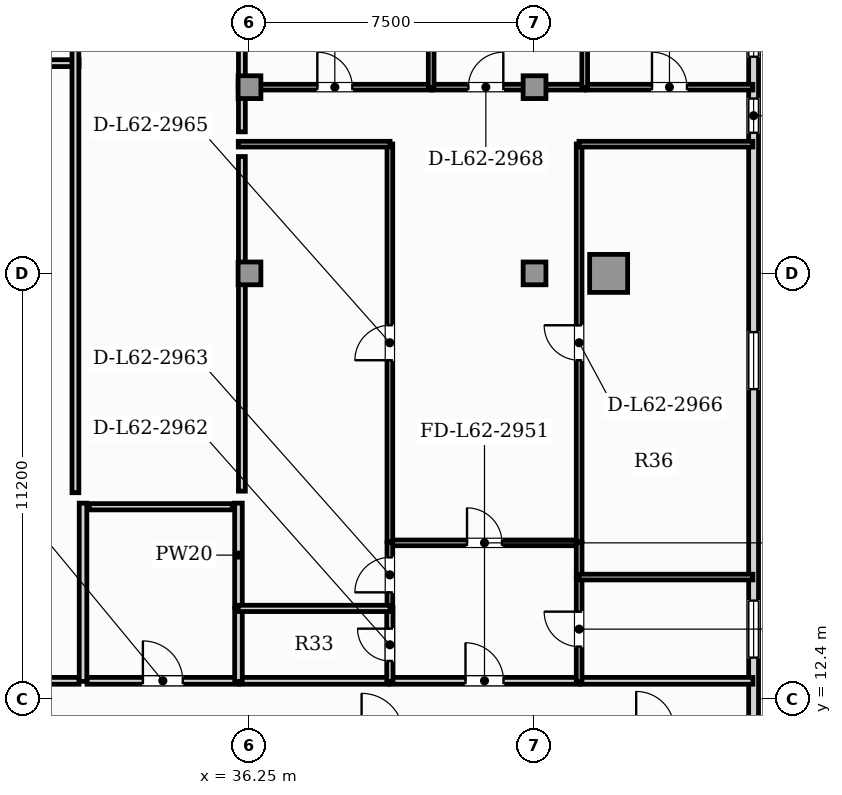
"""IFC4 building model, lengths in metres.
Left out: names, types, materials, properties, quantities, classifications, styles, units other than length and angle.
Written with IfcOpenShell. Run it as: python <this file> out.ifc"""

import sys

from ifc_helpers import new_model, si_unit, direction, frame, frame_2d, origin, origin_2d, place, context, subcontext, project, spatial, rectangle, hollow_rectangle, extrude, element, fill, save


model = new_model("IFC4")
c1 = context("Model", 3, precision=1e-05, world=origin(), true_north=direction((0.0, 1.0)))
c2 = subcontext(c1, "Body", "Model", "MODEL_VIEW")
j1 = project(units=[si_unit("LENGTHUNIT", "METRE"), si_unit("PLANEANGLEUNIT", "RADIAN")], contexts=[c1])
p1 = place(None, origin())
s1 = spatial("IfcSite", under=j1, at=p1, CompositionType="ELEMENT")
p2 = place(p1, origin())
s2 = spatial("IfcBuilding", under=s1, at=p2, CompositionType="ELEMENT")
p3 = place(p2, frame((0.0, 0.0, 251.7)))
s3 = spatial("IfcBuildingStorey", under=s2, at=p3, CompositionType="ELEMENT", Elevation=251.7)
p4 = place(p3, frame((45.7, 23.6, 0.0), z_axis=(0.0, 0.0, 1.0), x_axis=(1.0, 0.0, 0.0)))
e1 = element("IfcColumn", 1, at=p4, inside=s3, PredefinedType="USERDEFINED", context=c2, shape_type="SweptSolid", body=[
    extrude(hollow_rectangle(XDim=1.0, YDim=1.0, WallThickness=0.06, at=origin_2d()), origin(), (0.0, 0.0, 1.0), 5.05),
])
for number, where, z_axis, x_axis in (
    (2, (36.25, 23.6, 0.0), (0.0, 0.0, 1.0), (1.0, 0.0, 0.0)),
    (3, (43.75, 23.6, 0.0), (0.0, 0.0, 1.0), (1.0, 0.0, 0.0)),
    (4, (36.25, 28.5, 0.0), (0.0, 0.0, 1.0), (1.0, 0.0, 0.0)),
    (5, (43.75, 28.5, 0.0), (0.0, 0.0, 1.0), (1.0, 0.0, 0.0)),
):
    element("IfcColumn", number, at=place(p3, frame(where, z_axis=z_axis, x_axis=x_axis)), inside=s3, PredefinedType="COLUMN", context=c2, shape_type="SweptSolid", body=[
        extrude(rectangle(XDim=0.6, YDim=0.6, at=origin_2d()), origin(), (0.0, 0.0, 1.0), 5.05),
    ])
p5 = place(p3, frame((49.514, 3.24, 0.0), z_axis=(0.0, 0.0, 1.0), x_axis=(0.0, 1.0, 0.0)))
e6 = element("IfcWall", 6, at=p5, inside=s3, PredefinedType="SOLIDWALL", context=c2, shape_type="SweptSolid", body=[
    extrude(rectangle(XDim=29.692, YDim=0.26, at=frame_2d((14.846, 0.0))), origin(), (0.0, 0.0, 1.0), 4.85),
])
p6 = place(p5, frame((24.06, 0.0, 0.95)))
e7 = element("IfcOpeningElement", 7, at=p6, cuts=e6, PredefinedType="OPENING", context=c2, shape_type="SweptSolid", body=[
    extrude(rectangle(XDim=0.9, YDim=1.5, at=frame_2d((0.45, 0.75))), frame((0.0, 0.14, 0.0), z_axis=(0.0, -1.0, 0.0), x_axis=(1.0, 0.0, 0.0)), (0.0, 0.0, 1.0), 0.28),
])
p7 = place(p5, frame((10.25, 0.0, 0.9)))
e8 = element("IfcOpeningElement", 8, at=p7, cuts=e6, PredefinedType="OPENING", context=c2, shape_type="SweptSolid", body=[
    extrude(rectangle(XDim=1.5, YDim=1.95, at=frame_2d((0.75, 0.975))), frame((0.0, 0.14, 0.0), z_axis=(0.0, -1.0, 0.0), x_axis=(1.0, 0.0, 0.0)), (0.0, 0.0, 1.0), 0.28),
])
p8 = place(p5, frame((17.315, 0.0, 0.9)))
e9 = element("IfcOpeningElement", 9, at=p8, cuts=e6, PredefinedType="OPENING", context=c2, shape_type="SweptSolid", body=[
    extrude(rectangle(XDim=1.5, YDim=1.95, at=frame_2d((0.75, 0.975))), frame((0.0, 0.14, 0.0), z_axis=(0.0, -1.0, 0.0), x_axis=(1.0, 0.0, 0.0)), (0.0, 0.0, 1.0), 0.28),
])
p9 = place(p5, frame((26.061, 0.0, 0.9)))
e10 = element("IfcOpeningElement", 10, at=p9, cuts=e6, PredefinedType="OPENING", context=c2, shape_type="SweptSolid", body=[
    extrude(rectangle(XDim=1.5, YDim=1.95, at=frame_2d((0.75, 0.975))), frame((0.0, 0.14, 0.0), z_axis=(0.0, -1.0, 0.0), x_axis=(1.0, 0.0, 0.0)), (0.0, 0.0, 1.0), 0.28),
])
p10 = place(p3, frame((21.535, 12.88, 0.0), z_axis=(0.0, 0.0, 1.0), x_axis=(1.0, 0.0, 0.0)))
e11 = element("IfcWall", 11, at=p10, inside=s3, PredefinedType="PARTITIONING", context=c2, shape_type="SweptSolid", body=[
    extrude(rectangle(XDim=10.23, YDim=0.18, at=frame_2d((5.115, 0.0))), origin(), (0.0, 0.0, 1.0), 4.85),
])
p11 = place(p10, frame((3.081, 0.0, 0.0)))
e12 = element("IfcOpeningElement", 12, at=p11, cuts=e11, PredefinedType="OPENING", context=c2, shape_type="SweptSolid", body=[
    extrude(rectangle(XDim=1.0, YDim=2.15, at=frame_2d((0.5, 1.075))), frame((0.0, 0.1, 0.0), z_axis=(0.0, -1.0, 0.0), x_axis=(1.0, 0.0, 0.0)), (0.0, 0.0, 1.0), 0.2),
])
p12 = place(p3, frame((31.975, 12.88, 0.0), z_axis=(0.0, 0.0, 1.0), x_axis=(1.0, 0.0, 0.0)))
e13 = element("IfcWall", 13, at=p12, inside=s3, PredefinedType="PARTITIONING", context=c2, shape_type="SweptSolid", body=[
    extrude(rectangle(XDim=3.99, YDim=0.18, at=frame_2d((1.995, 0.0))), origin(), (0.0, 0.0, 1.0), 4.85),
])
p13 = place(p12, frame((1.47, 0.0, 0.0)))
e14 = element("IfcOpeningElement", 14, at=p13, cuts=e13, PredefinedType="OPENING", context=c2, shape_type="SweptSolid", body=[
    extrude(rectangle(XDim=1.05, YDim=2.15, at=frame_2d((0.525, 1.075))), frame((0.0, 0.1, 0.0), z_axis=(0.0, -1.0, 0.0), x_axis=(1.0, 0.0, 0.0)), (0.0, 0.0, 1.0), 0.2),
])
p14 = place(p3, frame((39.939, 12.88, 0.0), z_axis=(0.0, 0.0, 1.0), x_axis=(1.0, 0.0, 0.0)))
e15 = element("IfcWall", 15, at=p14, inside=s3, PredefinedType="PARTITIONING", context=c2, shape_type="SweptSolid", body=[
    extrude(rectangle(XDim=4.99, YDim=0.18, at=frame_2d((2.495, 0.0))), origin(), (0.0, 0.0, 1.0), 4.85),
])
p15 = place(p14, frame((1.995, 0.0, 0.0)))
e16 = element("IfcOpeningElement", 16, at=p15, cuts=e15, PredefinedType="OPENING", context=c2, shape_type="SweptSolid", body=[
    extrude(rectangle(XDim=1.0, YDim=2.15, at=frame_2d((0.5, 1.075))), frame((0.0, 0.1, 0.0), z_axis=(0.0, -1.0, 0.0), x_axis=(1.0, 0.0, 0.0)), (0.0, 0.0, 1.0), 0.2),
])
p16 = place(p3, frame((35.995, 12.88, 0.0), z_axis=(0.0, 0.0, 1.0), x_axis=(1.0, 0.0, 0.0)))
e17 = element("IfcWall", 17, at=p16, inside=s3, PredefinedType="PARTITIONING", context=c2, shape_type="SweptSolid", body=[
    extrude(rectangle(XDim=3.914, YDim=0.18, at=frame_2d((1.957, 0.0))), origin(), (0.0, 0.0, 1.0), 4.85),
])
p17 = place(p3, frame((44.959, 12.88, 0.0), z_axis=(0.0, 0.0, 1.0), x_axis=(1.0, 0.0, 0.0)))
e18 = element("IfcWall", 18, at=p17, inside=s3, PredefinedType="PARTITIONING", context=c2, shape_type="SweptSolid", body=[
    extrude(rectangle(XDim=4.536, YDim=0.18, at=frame_2d((2.268, 0.0))), origin(), (0.0, 0.0, 1.0), 4.85),
])
p18 = place(p3, frame((31.87, 12.865, 0.0), z_axis=(0.0, 0.0, 1.0), x_axis=(0.0, 1.0, 0.0)))
e19 = element("IfcWall", 19, at=p18, inside=s3, PredefinedType="PARTITIONING", context=c2, shape_type="SweptSolid", body=[
    extrude(rectangle(XDim=4.69, YDim=0.2, at=frame_2d((2.345, 0.0))), origin(), (0.0, 0.0, 1.0), 4.85),
])
p19 = place(p3, frame((35.96, 12.865, 0.0), z_axis=(0.0, 0.0, 1.0), x_axis=(0.0, 1.0, 0.0)))
e20 = element("IfcWall", 20, at=p19, inside=s3, PredefinedType="PARTITIONING", context=c2, shape_type="SweptSolid", body=[
    extrude(rectangle(XDim=1.925, YDim=0.2, at=frame_2d((0.963, 0.0))), origin(), (0.0, 0.0, 1.0), 4.85),
])
p20 = place(p3, frame((35.96, 14.82, 0.0), z_axis=(0.0, 0.0, 1.0), x_axis=(0.0, 1.0, 0.0)))
e21 = element("IfcWall", 21, at=p20, inside=s3, PredefinedType="PARTITIONING", context=c2, shape_type="SweptSolid", body=[
    extrude(rectangle(XDim=2.735, YDim=0.2, at=frame_2d((1.367, 0.0))), origin(), (0.0, 0.0, 1.0), 4.85),
])
p21 = place(p3, frame((39.939, 16.51, 0.0), z_axis=(0.0, 0.0, 1.0), x_axis=(1.0, 0.0, 0.0)))
e22 = element("IfcWall", 22, at=p21, inside=s3, PredefinedType="PARTITIONING", context=c2, shape_type="SweptSolid", body=[
    extrude(rectangle(XDim=4.99, YDim=0.15, at=frame_2d((2.495, 0.0))), origin(), (0.0, 0.0, 1.0), 4.85),
])
p22 = place(p21, frame((2.035, 0.0, 0.0)))
e23 = element("IfcOpeningElement", 23, at=p22, cuts=e22, PredefinedType="OPENING", context=c2, shape_type="SweptSolid", body=[
    extrude(rectangle(XDim=0.92, YDim=2.1, at=frame_2d((0.46, 1.05))), frame((0.0, 0.085, 0.0), z_axis=(0.0, -1.0, 0.0), x_axis=(1.0, 0.0, 0.0)), (0.0, 0.0, 1.0), 0.17),
])
p23 = place(p3, frame((39.944, 12.865, 0.0), z_axis=(0.0, 0.0, 1.0), x_axis=(0.0, 1.0, 0.0)))
e24 = element("IfcWall", 24, at=p23, inside=s3, PredefinedType="PLUMBINGWALL", context=c2, shape_type="SweptSolid", body=[
    extrude(rectangle(XDim=1.925, YDim=0.165, at=frame_2d((0.963, 0.0))), origin(), (0.0, 0.0, 1.0), 4.85),
])
p24 = place(p23, frame((0.538, 0.0, 0.0)))
e25 = element("IfcOpeningElement", 25, at=p24, cuts=e24, PredefinedType="OPENING", context=c2, shape_type="SweptSolid", body=[
    extrude(rectangle(XDim=0.85, YDim=2.1, at=frame_2d((0.425, 1.05))), frame((0.0, 0.093, 0.0), z_axis=(0.0, -1.0, 0.0), x_axis=(1.0, 0.0, 0.0)), (0.0, 0.0, 1.0), 0.185),
])
p25 = place(p3, frame((39.944, 14.82, 0.0), z_axis=(0.0, 0.0, 1.0), x_axis=(0.0, 1.0, 0.0)))
e26 = element("IfcWall", 26, at=p25, inside=s3, PredefinedType="PARTITIONING", context=c2, shape_type="SweptSolid", body=[
    extrude(rectangle(XDim=1.695, YDim=0.15, at=frame_2d((0.847, 0.0))), origin(), (0.0, 0.0, 1.0), 4.85),
])
p26 = place(p25, frame((0.387, 0.0, 0.0)))
e27 = element("IfcOpeningElement", 27, at=p26, cuts=e26, PredefinedType="OPENING", context=c2, shape_type="SweptSolid", body=[
    extrude(rectangle(XDim=0.92, YDim=2.1, at=frame_2d((0.46, 1.05))), frame((0.0, 0.085, 0.0), z_axis=(0.0, -1.0, 0.0), x_axis=(1.0, 0.0, 0.0)), (0.0, 0.0, 1.0), 0.17),
])
p27 = place(p3, frame((44.924, 12.865, 0.0), z_axis=(0.0, 0.0, 1.0), x_axis=(0.0, 1.0, 0.0)))
e28 = element("IfcWall", 28, at=p27, inside=s3, PredefinedType="PARTITIONING", context=c2, shape_type="SweptSolid", body=[
    extrude(rectangle(XDim=2.75, YDim=0.15, at=frame_2d((1.375, 0.0))), origin(), (0.0, 0.0, 1.0), 4.85),
])
p28 = place(p27, frame((0.915, 0.0, 0.0)))
e29 = element("IfcOpeningElement", 29, at=p28, cuts=e28, PredefinedType="OPENING", context=c2, shape_type="SweptSolid", body=[
    extrude(rectangle(XDim=0.92, YDim=2.1, at=frame_2d((0.46, 1.05))), frame((0.0, 0.085, 0.0), z_axis=(0.0, -1.0, 0.0), x_axis=(1.0, 0.0, 0.0)), (0.0, 0.0, 1.0), 0.17),
])
p29 = place(p3, frame((44.924, 15.645, 0.0), z_axis=(0.0, 0.0, 1.0), x_axis=(0.0, 1.0, 0.0)))
e30 = element("IfcWall", 30, at=p29, inside=s3, PredefinedType="PARTITIONING", context=c2, shape_type="SweptSolid", body=[
    extrude(rectangle(XDim=0.87, YDim=0.15, at=frame_2d((0.435, 0.0))), origin(), (0.0, 0.0, 1.0), 4.85),
])
p30 = place(p3, frame((39.944, 16.545, 0.0), z_axis=(0.0, 0.0, 1.0), x_axis=(0.0, 1.0, 0.0)))
e31 = element("IfcWall", 31, at=p30, inside=s3, PredefinedType="PARTITIONING", context=c2, shape_type="SweptSolid", body=[
    extrude(rectangle(XDim=10.46, YDim=0.15, at=frame_2d((5.23, 0.0))), origin(), (0.0, 0.0, 1.0), 4.85),
])
p31 = place(p30, frame((4.77, 0.0, 0.0)))
e32 = element("IfcOpeningElement", 32, at=p31, cuts=e31, PredefinedType="OPENING", context=c2, shape_type="SweptSolid", body=[
    extrude(rectangle(XDim=0.92, YDim=2.1, at=frame_2d((0.46, 1.05))), frame((0.0, 0.085, 0.0), z_axis=(0.0, -1.0, 0.0), x_axis=(1.0, 0.0, 0.0)), (0.0, 0.0, 1.0), 0.17),
])
p32 = place(p3, frame((35.955, 27.0, 0.0), z_axis=(0.0, 0.0, 1.0), x_axis=(1.0, 0.0, 0.0)))
e33 = element("IfcWall", 33, at=p32, inside=s3, PredefinedType="PARTITIONING", context=c2, shape_type="SweptSolid", body=[
    extrude(rectangle(XDim=3.994, YDim=0.15, at=frame_2d((1.997, 0.0))), origin(), (0.0, 0.0, 1.0), 4.85),
])
p33 = place(p3, frame((44.924, 16.545, 0.0), z_axis=(0.0, 0.0, 1.0), x_axis=(0.0, 1.0, 0.0)))
e34 = element("IfcWall", 34, at=p33, inside=s3, PredefinedType="PARTITIONING", context=c2, shape_type="SweptSolid", body=[
    extrude(rectangle(XDim=10.46, YDim=0.15, at=frame_2d((5.23, 0.0))), origin(), (0.0, 0.0, 1.0), 4.85),
])
p34 = place(p33, frame((4.77, 0.0, 0.0)))
e35 = element("IfcOpeningElement", 35, at=p34, cuts=e34, PredefinedType="OPENING", context=c2, shape_type="SweptSolid", body=[
    extrude(rectangle(XDim=0.92, YDim=2.1, at=frame_2d((0.46, 1.05))), frame((0.0, 0.085, 0.0), z_axis=(0.0, -1.0, 0.0), x_axis=(1.0, 0.0, 0.0)), (0.0, 0.0, 1.0), 0.17),
])
p35 = place(p3, frame((44.919, 27.0, 0.0), z_axis=(0.0, 0.0, 1.0), x_axis=(1.0, 0.0, 0.0)))
e36 = element("IfcWall", 36, at=p35, inside=s3, PredefinedType="PARTITIONING", context=c2, shape_type="SweptSolid", body=[
    extrude(rectangle(XDim=4.576, YDim=0.15, at=frame_2d((2.288, 0.0))), origin(), (0.0, 0.0, 1.0), 4.85),
])
p36 = place(p3, frame((35.955, 28.5, 0.0), z_axis=(0.0, 0.0, 1.0), x_axis=(1.0, 0.0, 0.0)))
e37 = element("IfcWall", 37, at=p36, inside=s3, PredefinedType="PARTITIONING", context=c2, shape_type="SweptSolid", body=[
    extrude(rectangle(XDim=5.08, YDim=0.15, at=frame_2d((2.54, 0.0))), origin(), (0.0, 0.0, 1.0), 4.306),
])
p37 = place(p36, frame((2.08, 0.0, 0.0)))
e38 = element("IfcOpeningElement", 38, at=p37, cuts=e37, PredefinedType="OPENING", context=c2, shape_type="SweptSolid", body=[
    extrude(rectangle(XDim=0.92, YDim=2.1, at=frame_2d((0.46, 1.05))), frame((0.0, 0.085, 0.0), z_axis=(0.0, -1.0, 0.0), x_axis=(1.0, 0.0, 0.0)), (0.0, 0.0, 1.0), 0.17),
])
p38 = place(p3, frame((41.065, 28.5, 0.0), z_axis=(0.0, 0.0, 1.0), x_axis=(1.0, 0.0, 0.0)))
e39 = element("IfcWall", 39, at=p38, inside=s3, PredefinedType="PARTITIONING", context=c2, shape_type="SweptSolid", body=[
    extrude(rectangle(XDim=4.011, YDim=0.15, at=frame_2d((2.005, 0.0))), origin(), (0.0, 0.0, 1.0), 4.306),
])
p39 = place(p38, frame((0.944, 0.0, 0.0)))
e40 = element("IfcOpeningElement", 40, at=p39, cuts=e39, PredefinedType="OPENING", context=c2, shape_type="SweptSolid", body=[
    extrude(rectangle(XDim=0.92, YDim=2.1, at=frame_2d((0.46, 1.05))), frame((0.0, 0.085, 0.0), z_axis=(0.0, -1.0, 0.0), x_axis=(1.0, 0.0, 0.0)), (0.0, 0.0, 1.0), 0.17),
])
p40 = place(p3, frame((45.106, 28.5, 0.0), z_axis=(0.0, 0.0, 1.0), x_axis=(1.0, 0.0, 0.0)))
e41 = element("IfcWall", 41, at=p40, inside=s3, PredefinedType="PARTITIONING", context=c2, shape_type="SweptSolid", body=[
    extrude(rectangle(XDim=4.389, YDim=0.15, at=frame_2d((2.194, 0.0))), origin(), (0.0, 0.0, 1.0), 4.85),
])
p41 = place(p40, frame((1.734, 0.0, 0.0)))
e42 = element("IfcOpeningElement", 42, at=p41, cuts=e41, PredefinedType="OPENING", context=c2, shape_type="SweptSolid", body=[
    extrude(rectangle(XDim=0.92, YDim=2.1, at=frame_2d((0.46, 1.05))), frame((0.0, 0.085, 0.0), z_axis=(0.0, -1.0, 0.0), x_axis=(1.0, 0.0, 0.0)), (0.0, 0.0, 1.0), 0.17),
])
p42 = place(p3, frame((35.955, 14.785, 0.0), z_axis=(0.0, 0.0, 1.0), x_axis=(1.0, 0.0, 0.0)))
e43 = element("IfcWall", 43, at=p42, inside=s3, PredefinedType="PLUMBINGWALL", context=c2, shape_type="SweptSolid", body=[
    extrude(rectangle(XDim=3.994, YDim=0.165, at=frame_2d((1.997, 0.0))), origin(), (0.0, 0.0, 1.0), 4.85),
])
p43 = place(p3, frame((44.919, 15.61, 0.0), z_axis=(0.0, 0.0, 1.0), x_axis=(1.0, 0.0, 0.0)))
e44 = element("IfcWall", 44, at=p43, inside=s3, PredefinedType="PARTITIONING", context=c2, shape_type="SweptSolid", body=[
    extrude(rectangle(XDim=4.576, YDim=0.15, at=frame_2d((2.288, 0.0))), origin(), (0.0, 0.0, 1.0), 4.85),
])
p44 = place(p3, frame((41.03, 28.495, 0.0), z_axis=(0.0, 0.0, 1.0), x_axis=(0.0, 1.0, 0.0)))
e45 = element("IfcWall", 45, at=p44, inside=s3, PredefinedType="PARTITIONING", context=c2, shape_type="SweptSolid", body=[
    extrude(rectangle(XDim=7.527, YDim=0.15, at=frame_2d((3.764, 0.0))), origin(), (0.0, 0.0, 1.0), 4.85),
])
p45 = place(p3, frame((45.071, 28.495, 0.0), z_axis=(0.0, 0.0, 1.0), x_axis=(0.0, 1.0, 0.0)))
e46 = element("IfcWall", 46, at=p45, inside=s3, PredefinedType="PARTITIONING", context=c2, shape_type="SweptSolid", body=[
    extrude(rectangle(XDim=7.553, YDim=0.15, at=frame_2d((3.776, 0.0))), origin(), (0.0, 0.0, 1.0), 4.85),
])
p46 = place(p3, frame((24.183, 29.132, 0.0), z_axis=(0.0, 0.0, 1.0), x_axis=(1.0, 0.0, 0.0)))
e47 = element("IfcWall", 47, at=p46, inside=s3, PredefinedType="PARTITIONING", context=c2, shape_type="SweptSolid", body=[
    extrude(rectangle(XDim=7.582, YDim=0.18, at=frame_2d((3.791, 0.0))), origin(), (0.0, 0.0, 1.0), 4.85),
])
p47 = place(p3, frame((31.67, 29.824, 0.0), z_axis=(0.0, 0.0, 1.0), x_axis=(0.0, -1.0, 0.0)))
e48 = element("IfcWall", 48, at=p47, inside=s3, PredefinedType="PARTITIONING", context=c2, shape_type="SweptSolid", body=[
    extrude(rectangle(XDim=11.995, YDim=0.18, at=frame_2d((5.998, 0.0))), origin(), (0.0, 0.0, 1.0), 4.85),
])
p48 = place(p3, frame((32.035, 17.46, 0.0), z_axis=(0.0, 0.0, 1.0), x_axis=(1.0, 0.0, 0.0)))
e49 = element("IfcWall", 49, at=p48, inside=s3, PredefinedType="PLUMBINGWALL", context=c2, shape_type="SweptSolid", body=[
    extrude(rectangle(XDim=3.76, YDim=0.165, at=frame_2d((1.88, 0.0))), origin(), (0.0, 0.0, 1.0), 4.85),
])
p49 = place(p3, frame((36.05, 27.325, 0.0), z_axis=(0.0, 0.0, 1.0), x_axis=(0.0, 1.0, 0.0)))
e50 = element("IfcWall", 50, at=p49, inside=s3, PredefinedType="PARTITIONING", context=c2, shape_type="SweptSolid", body=[
    extrude(rectangle(XDim=2.504, YDim=0.18, at=frame_2d((1.252, 0.0))), origin(), (0.0, 0.0, 1.0), 4.85),
])
p50 = place(p3, frame((36.05, 17.87, 0.0), z_axis=(0.0, 0.0, 1.0), x_axis=(0.0, 1.0, 0.0)))
e51 = element("IfcWall", 51, at=p50, inside=s3, PredefinedType="PARTITIONING", context=c2, shape_type="SweptSolid", body=[
    extrude(rectangle(XDim=8.805, YDim=0.18, at=frame_2d((4.403, 0.0))), origin(), (0.0, 0.0, 1.0), 4.495),
])
p51 = place(p6, origin())
e52 = element("IfcWindow", 52, at=p51, inside=s3, PartitioningType="SINGLE_PANEL", PredefinedType="WINDOW", context=c2, shape_type="SweptSolid", body=[
    extrude(rectangle(XDim=0.9, YDim=1.5, at=frame_2d((0.45, 0.75))), frame((0.0, 0.03, 0.0), z_axis=(0.0, -1.0, 0.0), x_axis=(1.0, 0.0, 0.0)), (0.0, 0.0, 1.0), 0.06),
])
fill(e7, e52)
p52 = place(p7, origin())
e53 = element("IfcWindow", 53, at=p52, inside=s3, PartitioningType="SINGLE_PANEL", PredefinedType="WINDOW", context=c2, shape_type="SweptSolid", body=[
    extrude(rectangle(XDim=1.5, YDim=1.95, at=frame_2d((0.75, 0.975))), frame((0.0, 0.03, 0.0), z_axis=(0.0, -1.0, 0.0), x_axis=(1.0, 0.0, 0.0)), (0.0, 0.0, 1.0), 0.06),
])
fill(e8, e53)
p53 = place(p8, origin())
e54 = element("IfcWindow", 54, at=p53, inside=s3, PartitioningType="SINGLE_PANEL", PredefinedType="WINDOW", context=c2, shape_type="SweptSolid", body=[
    extrude(rectangle(XDim=1.5, YDim=1.95, at=frame_2d((0.75, 0.975))), frame((0.0, 0.03, 0.0), z_axis=(0.0, -1.0, 0.0), x_axis=(1.0, 0.0, 0.0)), (0.0, 0.0, 1.0), 0.06),
])
fill(e9, e54)
p54 = place(p9, origin())
e55 = element("IfcWindow", 55, at=p54, inside=s3, PartitioningType="SINGLE_PANEL", PredefinedType="WINDOW", context=c2, shape_type="SweptSolid", body=[
    extrude(rectangle(XDim=1.5, YDim=1.95, at=frame_2d((0.75, 0.975))), frame((0.0, 0.03, 0.0), z_axis=(0.0, -1.0, 0.0), x_axis=(1.0, 0.0, 0.0)), (0.0, 0.0, 1.0), 0.06),
])
fill(e10, e55)
p55 = place(p13, origin())
e56 = element("IfcDoor", 56, at=p55, inside=s3, OperationType="SINGLE_SWING_LEFT", PredefinedType="DOOR", context=c2, shape_type="SweptSolid", body=[
    extrude(rectangle(XDim=1.05, YDim=2.15, at=frame_2d((0.525, 1.075))), frame((0.0, 0.025, 0.0), z_axis=(0.0, -1.0, 0.0), x_axis=(1.0, 0.0, 0.0)), (0.0, 0.0, 1.0), 0.05),
])
fill(e14, e56)
p56 = place(p15, origin())
e57 = element("IfcDoor", 57, at=p56, inside=s3, OperationType="SINGLE_SWING_LEFT", PredefinedType="DOOR", context=c2, shape_type="SweptSolid", body=[
    extrude(rectangle(XDim=1.0, YDim=2.15, at=frame_2d((0.5, 1.075))), frame((0.0, 0.025, 0.0), z_axis=(0.0, -1.0, 0.0), x_axis=(1.0, 0.0, 0.0)), (0.0, 0.0, 1.0), 0.05),
])
fill(e16, e57)
p57 = place(p22, origin())
e58 = element("IfcDoor", 58, at=p57, inside=s3, OperationType="SINGLE_SWING_LEFT", PredefinedType="DOOR", context=c2, shape_type="SweptSolid", body=[
    extrude(rectangle(XDim=0.92, YDim=2.1, at=frame_2d((0.46, 1.05))), frame((0.0, 0.025, 0.0), z_axis=(0.0, -1.0, 0.0), x_axis=(1.0, 0.0, 0.0)), (0.0, 0.0, 1.0), 0.05),
])
fill(e23, e58)
p58 = place(p24, origin())
e59 = element("IfcDoor", 59, at=p58, inside=s3, OperationType="SINGLE_SWING_RIGHT", PredefinedType="DOOR", context=c2, shape_type="SweptSolid", body=[
    extrude(rectangle(XDim=0.85, YDim=2.1, at=frame_2d((0.425, 1.05))), frame((0.0, 0.025, 0.0), z_axis=(0.0, -1.0, 0.0), x_axis=(1.0, 0.0, 0.0)), (0.0, 0.0, 1.0), 0.05),
])
fill(e25, e59)
p59 = place(p26, origin())
e60 = element("IfcDoor", 60, at=p59, inside=s3, OperationType="SINGLE_SWING_LEFT", PredefinedType="DOOR", context=c2, shape_type="SweptSolid", body=[
    extrude(rectangle(XDim=0.92, YDim=2.1, at=frame_2d((0.46, 1.05))), frame((0.0, 0.025, 0.0), z_axis=(0.0, -1.0, 0.0), x_axis=(1.0, 0.0, 0.0)), (0.0, 0.0, 1.0), 0.05),
])
fill(e27, e60)
p60 = place(p28, origin())
e61 = element("IfcDoor", 61, at=p60, inside=s3, OperationType="SINGLE_SWING_RIGHT", PredefinedType="DOOR", context=c2, shape_type="SweptSolid", body=[
    extrude(rectangle(XDim=0.92, YDim=2.1, at=frame_2d((0.46, 1.05))), frame((0.0, 0.025, 0.0), z_axis=(0.0, -1.0, 0.0), x_axis=(1.0, 0.0, 0.0)), (0.0, 0.0, 1.0), 0.05),
])
fill(e29, e61)
p61 = place(p31, origin())
e62 = element("IfcDoor", 62, at=p61, inside=s3, OperationType="SINGLE_SWING_LEFT", PredefinedType="DOOR", context=c2, shape_type="SweptSolid", body=[
    extrude(rectangle(XDim=0.92, YDim=2.1, at=frame_2d((0.46, 1.05))), frame((0.0, 0.025, 0.0), z_axis=(0.0, -1.0, 0.0), x_axis=(1.0, 0.0, 0.0)), (0.0, 0.0, 1.0), 0.05),
])
fill(e32, e62)
p62 = place(p34, origin())
e63 = element("IfcDoor", 63, at=p62, inside=s3, OperationType="SINGLE_SWING_RIGHT", PredefinedType="DOOR", context=c2, shape_type="SweptSolid", body=[
    extrude(rectangle(XDim=0.92, YDim=2.1, at=frame_2d((0.46, 1.05))), frame((0.0, 0.025, 0.0), z_axis=(0.0, -1.0, 0.0), x_axis=(1.0, 0.0, 0.0)), (0.0, 0.0, 1.0), 0.05),
])
fill(e35, e63)
p63 = place(p37, origin())
e64 = element("IfcDoor", 64, at=p63, inside=s3, OperationType="SINGLE_SWING_LEFT", PredefinedType="DOOR", context=c2, shape_type="SweptSolid", body=[
    extrude(rectangle(XDim=0.92, YDim=2.1, at=frame_2d((0.46, 1.05))), frame((0.0, 0.025, 0.0), z_axis=(0.0, -1.0, 0.0), x_axis=(1.0, 0.0, 0.0)), (0.0, 0.0, 1.0), 0.05),
])
fill(e38, e64)
p64 = place(p39, origin())
e65 = element("IfcDoor", 65, at=p64, inside=s3, OperationType="SINGLE_SWING_RIGHT", PredefinedType="DOOR", context=c2, shape_type="SweptSolid", body=[
    extrude(rectangle(XDim=0.92, YDim=2.1, at=frame_2d((0.46, 1.05))), frame((0.0, 0.025, 0.0), z_axis=(0.0, -1.0, 0.0), x_axis=(1.0, 0.0, 0.0)), (0.0, 0.0, 1.0), 0.05),
])
fill(e40, e65)
p65 = place(p41, origin())
e66 = element("IfcDoor", 66, at=p65, inside=s3, OperationType="SINGLE_SWING_LEFT", PredefinedType="DOOR", context=c2, shape_type="SweptSolid", body=[
    extrude(rectangle(XDim=0.92, YDim=2.1, at=frame_2d((0.46, 1.05))), frame((0.0, 0.025, 0.0), z_axis=(0.0, -1.0, 0.0), x_axis=(1.0, 0.0, 0.0)), (0.0, 0.0, 1.0), 0.05),
])
fill(e42, e66)
save(model, sys.argv[1])
